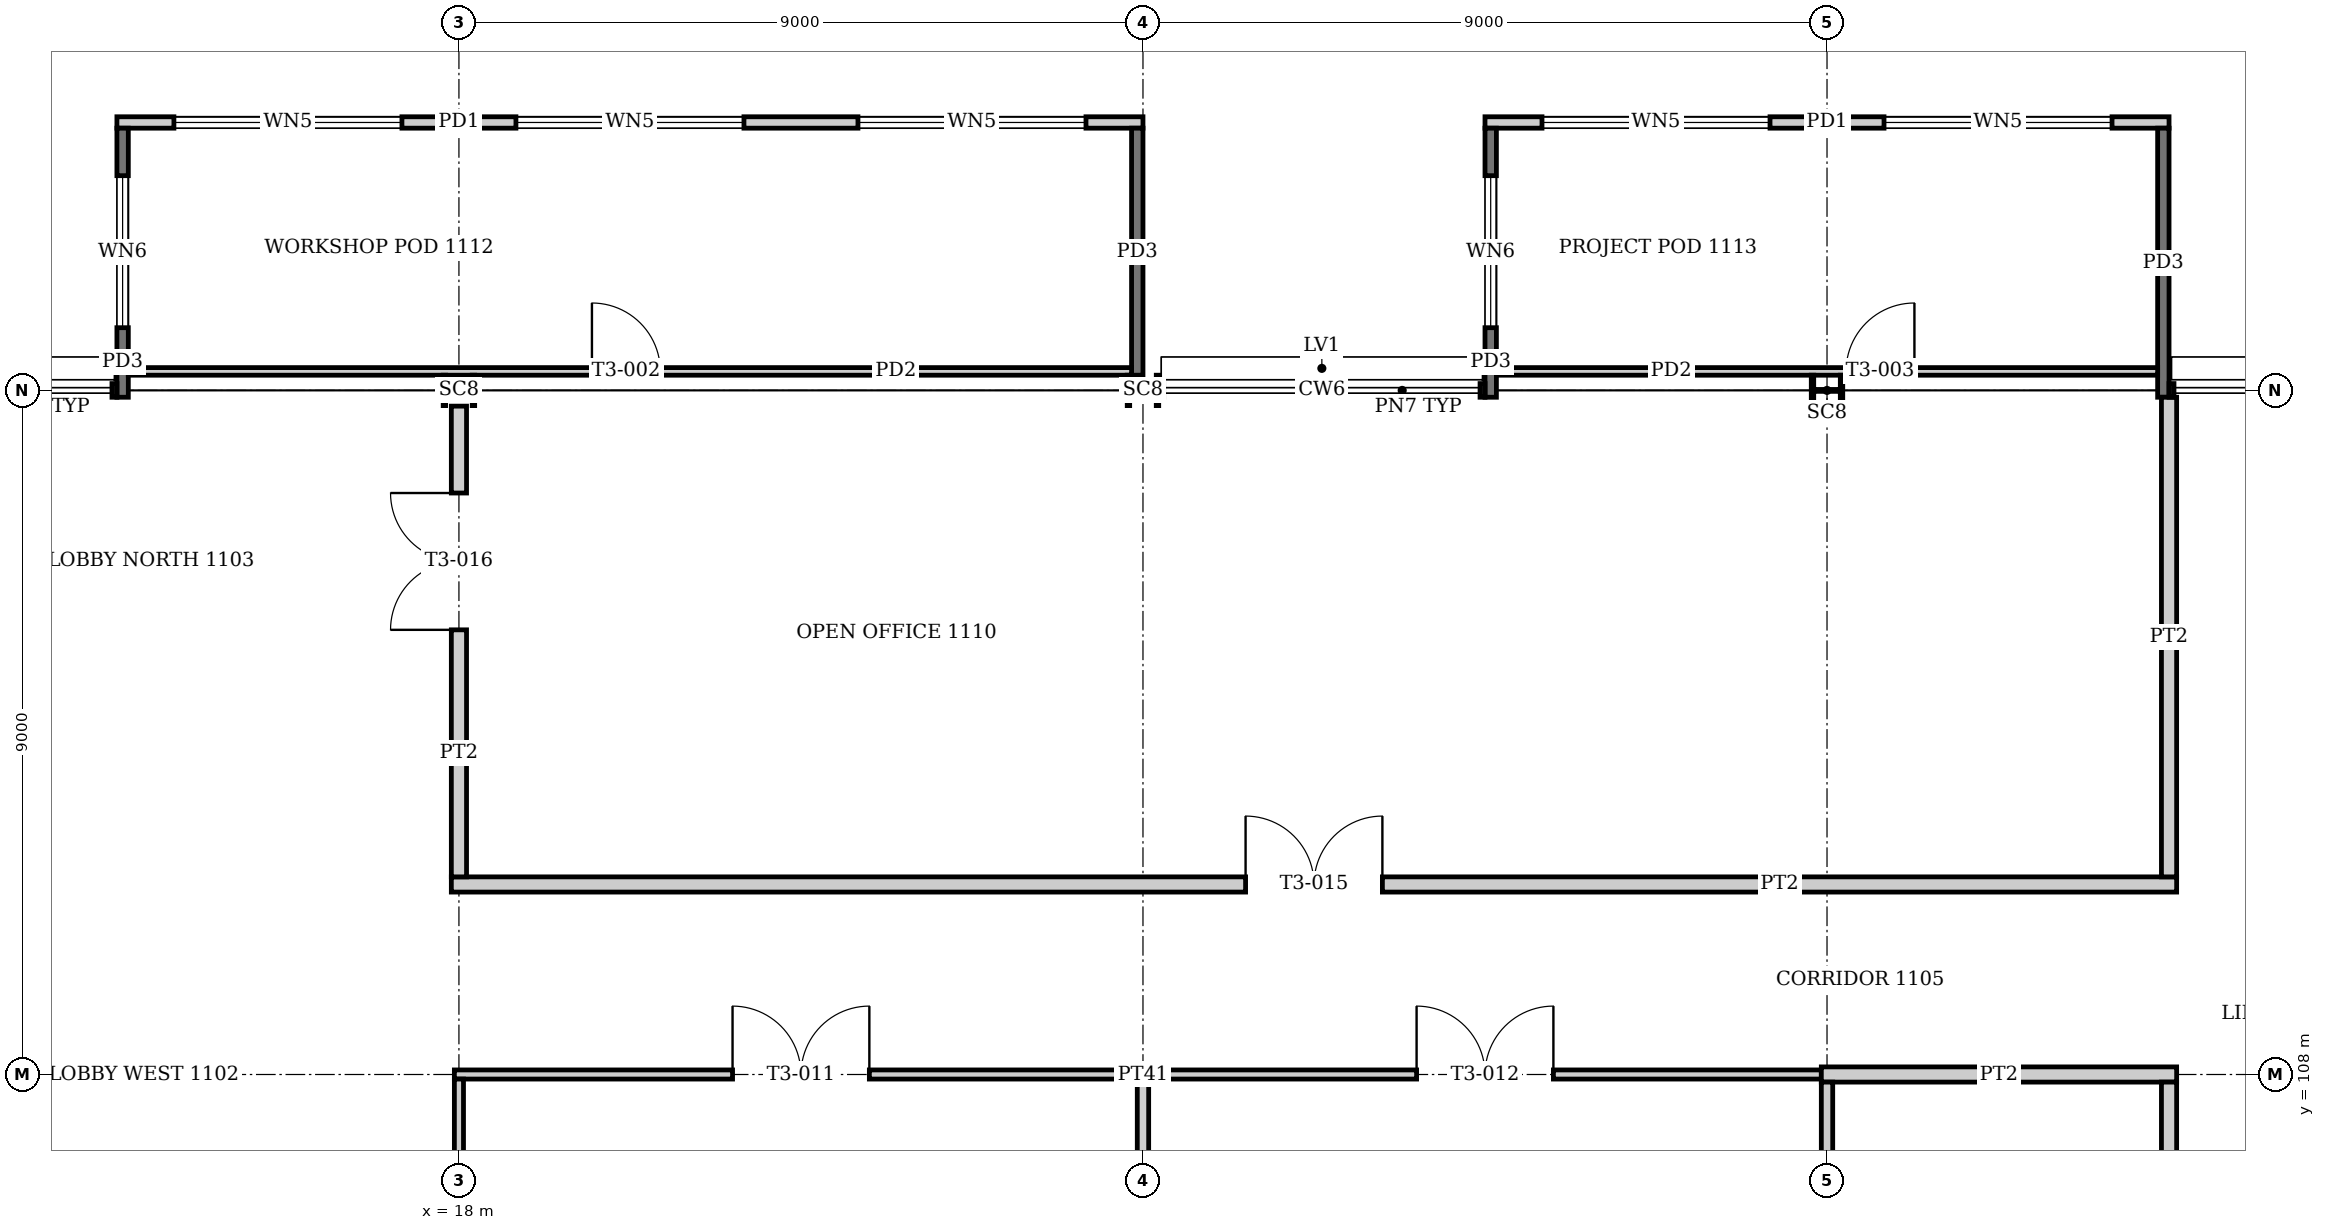
"""IFC4 building model, lengths in metres.
Left out: names, types, materials, properties, quantities, classifications, styles, units other than length and angle.
Written with IfcOpenShell. Run it as: python <this file> out.ifc"""

import sys

from ifc_helpers import new_model, si_unit, direction, frame, frame_2d, origin, origin_2d, place, context, subcontext, project, spatial, rectangle, i_section, extrude, element, fill, save


model = new_model("IFC4")
c1 = context("Model", 3, precision=1e-05, world=origin(), true_north=direction((0.0, 1.0)))
c2 = subcontext(c1, "Body", "Model", "MODEL_VIEW")
j1 = project(units=[si_unit("LENGTHUNIT", "METRE"), si_unit("PLANEANGLEUNIT", "RADIAN")], contexts=[c1])
p1 = place(None, origin())
s1 = spatial("IfcSite", under=j1, at=p1, CompositionType="ELEMENT")
p2 = place(p1, origin())
s2 = spatial("IfcBuilding", under=s1, at=p2, CompositionType="ELEMENT")
p3 = place(p2, frame((0.0, 0.0, 47.2)))
s3 = spatial("IfcBuildingStorey", under=s2, at=p3, CompositionType="ELEMENT", Elevation=47.2)
for number, where, z_axis, x_axis in (
    (1, (18.0, 117.0, 0.0), (0.0, 0.0, 1.0), (0.0, 1.0, 0.0)),
    (2, (27.0, 117.0, 0.0), (0.0, 0.0, 1.0), (0.0, 1.0, 0.0)),
    (3, (36.0, 117.0, 0.0), (0.0, 0.0, 1.0), (0.0, 1.0, 0.0)),
):
    element("IfcColumn", number, at=place(p3, frame(where, z_axis=z_axis, x_axis=x_axis)), inside=s3, PredefinedType="COLUMN", context=c2, shape_type="SweptSolid", body=[
        extrude(i_section(OverallWidth=0.4, OverallDepth=0.414, WebThickness=0.025, FlangeThickness=0.032, at=origin_2d()), origin(), (0.0, 0.0, 1.0), 4.0),
    ])
p4 = place(p3, frame((13.5, 120.525, 0.0), z_axis=(0.0, 0.0, 1.0), x_axis=(1.0, 0.0, 0.0)))
e4 = element("IfcWall", 4, at=p4, inside=s3, PredefinedType="SOLIDWALL", context=c2, shape_type="SweptSolid", body=[
    extrude(rectangle(XDim=13.5, YDim=0.15, at=frame_2d((6.75, 0.0))), origin(), (0.0, 0.0, 1.0), 2.6),
])
p5 = place(p4, frame((0.75, 0.0, 0.9)))
e5 = element("IfcOpeningElement", 5, at=p5, cuts=e4, PredefinedType="OPENING", context=c2, shape_type="SweptSolid", body=[
    extrude(rectangle(XDim=3.0, YDim=1.4, at=frame_2d((1.5, 0.7))), frame((0.0, 0.085, 0.0), z_axis=(0.0, -1.0, 0.0), x_axis=(1.0, 0.0, 0.0)), (0.0, 0.0, 1.0), 0.17),
])
p6 = place(p4, frame((5.25, 0.0, 0.9)))
e6 = element("IfcOpeningElement", 6, at=p6, cuts=e4, PredefinedType="OPENING", context=c2, shape_type="SweptSolid", body=[
    extrude(rectangle(XDim=3.0, YDim=1.4, at=frame_2d((1.5, 0.7))), frame((0.0, 0.085, 0.0), z_axis=(0.0, -1.0, 0.0), x_axis=(1.0, 0.0, 0.0)), (0.0, 0.0, 1.0), 0.17),
])
p7 = place(p4, frame((9.75, 0.0, 0.9)))
e7 = element("IfcOpeningElement", 7, at=p7, cuts=e4, PredefinedType="OPENING", context=c2, shape_type="SweptSolid", body=[
    extrude(rectangle(XDim=3.0, YDim=1.4, at=frame_2d((1.5, 0.7))), frame((0.0, 0.085, 0.0), z_axis=(0.0, -1.0, 0.0), x_axis=(1.0, 0.0, 0.0)), (0.0, 0.0, 1.0), 0.17),
])
p8 = place(p3, frame((13.575, 120.45, -0.15), z_axis=(0.0, 0.0, 1.0), x_axis=(0.0, -1.0, 0.0)))
e8 = element("IfcWall", 8, at=p8, inside=s3, PredefinedType="SOLIDWALL", context=c2, shape_type="SweptSolid", body=[
    extrude(rectangle(XDim=3.54, YDim=0.15, at=frame_2d((1.77, 0.0))), origin(), (0.0, 0.0, 1.0), 2.75),
])
p9 = place(p8, frame((0.625, 0.0, 1.05)))
e9 = element("IfcOpeningElement", 9, at=p9, cuts=e8, PredefinedType="OPENING", context=c2, shape_type="SweptSolid", body=[
    extrude(rectangle(XDim=2.0, YDim=1.4, at=frame_2d((1.0, 0.7))), frame((0.0, 0.085, 0.0), z_axis=(0.0, -1.0, 0.0), x_axis=(1.0, 0.0, 0.0)), (0.0, 0.0, 1.0), 0.17),
])
p10 = place(p3, frame((26.925, 120.45, -0.15), z_axis=(0.0, 0.0, 1.0), x_axis=(0.0, -1.0, 0.0)))
e10 = element("IfcWall", 10, at=p10, inside=s3, PredefinedType="SOLIDWALL", context=c2, shape_type="SweptSolid", body=[
    extrude(rectangle(XDim=3.25, YDim=0.15, at=frame_2d((1.625, 0.0))), origin(), (0.0, 0.0, 1.0), 2.75),
])
p11 = place(p3, frame((13.65, 117.25, 0.0), z_axis=(0.0, 0.0, 1.0), x_axis=(1.0, 0.0, 0.0)))
e11 = element("IfcWall", 11, at=p11, inside=s3, PredefinedType="PARTITIONING", context=c2, shape_type="SweptSolid", body=[
    extrude(rectangle(XDim=13.2, YDim=0.1, at=frame_2d((6.6, 0.0))), origin(), (0.0, 0.0, 1.0), 2.6),
])
p12 = place(p11, frame((6.1, 0.0, 0.0)))
e12 = element("IfcOpeningElement", 12, at=p12, cuts=e11, PredefinedType="OPENING", context=c2, shape_type="SweptSolid", body=[
    extrude(rectangle(XDim=0.9, YDim=2.1, at=frame_2d((0.45, 1.05))), frame((0.0, 0.06, 0.0), z_axis=(0.0, -1.0, 0.0), x_axis=(1.0, 0.0, 0.0)), (0.0, 0.0, 1.0), 0.12),
])
p13 = place(p3, frame((31.5, 120.525, 0.0), z_axis=(0.0, 0.0, 1.0), x_axis=(1.0, 0.0, 0.0)))
e13 = element("IfcWall", 13, at=p13, inside=s3, PredefinedType="SOLIDWALL", context=c2, shape_type="SweptSolid", body=[
    extrude(rectangle(XDim=9.0, YDim=0.15, at=frame_2d((4.5, 0.0))), origin(), (0.0, 0.0, 1.0), 2.6),
])
p14 = place(p13, frame((0.75, 0.0, 0.9)))
e14 = element("IfcOpeningElement", 14, at=p14, cuts=e13, PredefinedType="OPENING", context=c2, shape_type="SweptSolid", body=[
    extrude(rectangle(XDim=3.0, YDim=1.4, at=frame_2d((1.5, 0.7))), frame((0.0, 0.085, 0.0), z_axis=(0.0, -1.0, 0.0), x_axis=(1.0, 0.0, 0.0)), (0.0, 0.0, 1.0), 0.17),
])
p15 = place(p13, frame((5.25, 0.0, 0.9)))
e15 = element("IfcOpeningElement", 15, at=p15, cuts=e13, PredefinedType="OPENING", context=c2, shape_type="SweptSolid", body=[
    extrude(rectangle(XDim=3.0, YDim=1.4, at=frame_2d((1.5, 0.7))), frame((0.0, 0.085, 0.0), z_axis=(0.0, -1.0, 0.0), x_axis=(1.0, 0.0, 0.0)), (0.0, 0.0, 1.0), 0.17),
])
p16 = place(p3, frame((31.575, 120.45, -0.15), z_axis=(0.0, 0.0, 1.0), x_axis=(0.0, -1.0, 0.0)))
e16 = element("IfcWall", 16, at=p16, inside=s3, PredefinedType="SOLIDWALL", context=c2, shape_type="SweptSolid", body=[
    extrude(rectangle(XDim=3.54, YDim=0.15, at=frame_2d((1.77, 0.0))), origin(), (0.0, 0.0, 1.0), 2.75),
])
p17 = place(p16, frame((0.625, 0.0, 1.05)))
e17 = element("IfcOpeningElement", 17, at=p17, cuts=e16, PredefinedType="OPENING", context=c2, shape_type="SweptSolid", body=[
    extrude(rectangle(XDim=2.0, YDim=1.4, at=frame_2d((1.0, 0.7))), frame((0.0, 0.085, 0.0), z_axis=(0.0, -1.0, 0.0), x_axis=(1.0, 0.0, 0.0)), (0.0, 0.0, 1.0), 0.17),
])
p18 = place(p3, frame((40.425, 120.45, -0.15), z_axis=(0.0, 0.0, 1.0), x_axis=(0.0, -1.0, 0.0)))
e18 = element("IfcWall", 18, at=p18, inside=s3, PredefinedType="SOLIDWALL", context=c2, shape_type="SweptSolid", body=[
    extrude(rectangle(XDim=3.54, YDim=0.15, at=frame_2d((1.77, 0.0))), origin(), (0.0, 0.0, 1.0), 2.75),
])
p19 = place(p3, frame((31.65, 117.25, 0.0), z_axis=(0.0, 0.0, 1.0), x_axis=(1.0, 0.0, 0.0)))
e19 = element("IfcWall", 19, at=p19, inside=s3, PredefinedType="PARTITIONING", context=c2, shape_type="SweptSolid", body=[
    extrude(rectangle(XDim=8.7, YDim=0.1, at=frame_2d((4.35, 0.0))), origin(), (0.0, 0.0, 1.0), 2.6),
])
p20 = place(p19, frame((4.6, 0.0, 0.0)))
e20 = element("IfcOpeningElement", 20, at=p20, cuts=e19, PredefinedType="OPENING", context=c2, shape_type="SweptSolid", body=[
    extrude(rectangle(XDim=0.9, YDim=2.1, at=frame_2d((0.45, 1.05))), frame((0.0, 0.06, 0.0), z_axis=(0.0, -1.0, 0.0), x_axis=(1.0, 0.0, 0.0)), (0.0, 0.0, 1.0), 0.12),
])
p21 = place(p3, frame((17.94, 108.0, 0.0), z_axis=(0.0, 0.0, 1.0), x_axis=(1.0, 0.0, 0.0)))
e21 = element("IfcWall", 21, at=p21, inside=s3, PredefinedType="PARTITIONING", context=c2, shape_type="SweptSolid", body=[
    extrude(rectangle(XDim=17.985, YDim=0.12, at=frame_2d((8.993, 0.0))), origin(), (0.0, 0.0, 1.0), 3.05),
])
p22 = place(p21, frame((3.66, 0.0, 0.0)))
e22 = element("IfcOpeningElement", 22, at=p22, cuts=e21, PredefinedType="OPENING", context=c2, shape_type="SweptSolid", body=[
    extrude(rectangle(XDim=1.8, YDim=2.1, at=frame_2d((0.9, 1.05))), frame((0.0, 0.07, 0.0), z_axis=(0.0, -1.0, 0.0), x_axis=(1.0, 0.0, 0.0)), (0.0, 0.0, 1.0), 0.14),
])
p23 = place(p21, frame((12.66, 0.0, 0.0)))
e23 = element("IfcOpeningElement", 23, at=p23, cuts=e21, PredefinedType="OPENING", context=c2, shape_type="SweptSolid", body=[
    extrude(rectangle(XDim=1.8, YDim=2.1, at=frame_2d((0.9, 1.05))), frame((0.0, 0.07, 0.0), z_axis=(0.0, -1.0, 0.0), x_axis=(1.0, 0.0, 0.0)), (0.0, 0.0, 1.0), 0.14),
])
p24 = place(p3, frame((35.925, 108.0, 0.0), z_axis=(0.0, 0.0, 1.0), x_axis=(1.0, 0.0, 0.0)))
e24 = element("IfcWall", 24, at=p24, inside=s3, PredefinedType="PARTITIONING", context=c2, shape_type="SweptSolid", body=[
    extrude(rectangle(XDim=4.675, YDim=0.2, at=frame_2d((2.337, 0.0))), origin(), (0.0, 0.0, 1.0), 3.05),
])
p25 = place(p3, frame((17.9, 110.5, 0.0), z_axis=(0.0, 0.0, 1.0), x_axis=(1.0, 0.0, 0.0)))
e25 = element("IfcWall", 25, at=p25, inside=s3, PredefinedType="PARTITIONING", context=c2, shape_type="SweptSolid", body=[
    extrude(rectangle(XDim=22.7, YDim=0.2, at=frame_2d((11.35, 0.0))), origin(), (0.0, 0.0, 1.0), 3.05),
])
p26 = place(p25, frame((10.45, 0.0, 0.0)))
e26 = element("IfcOpeningElement", 26, at=p26, cuts=e25, PredefinedType="OPENING", context=c2, shape_type="SweptSolid", body=[
    extrude(rectangle(XDim=1.8, YDim=2.1, at=frame_2d((0.9, 1.05))), frame((0.0, 0.11, 0.0), z_axis=(0.0, -1.0, 0.0), x_axis=(1.0, 0.0, 0.0)), (0.0, 0.0, 1.0), 0.22),
])
p27 = place(p3, frame((18.0, 99.207, 0.0), z_axis=(0.0, 0.0, 1.0), x_axis=(0.0, 1.0, 0.0)))
e27 = element("IfcWall", 27, at=p27, inside=s3, PredefinedType="PARTITIONING", context=c2, shape_type="SweptSolid", body=[
    extrude(rectangle(XDim=8.733, YDim=0.12, at=frame_2d((4.366, 0.0))), origin(), (0.0, 0.0, 1.0), 3.05),
])
p28 = place(p3, frame((18.0, 110.6, 0.0), z_axis=(0.0, 0.0, 1.0), x_axis=(0.0, 1.0, 0.0)))
e28 = element("IfcWall", 28, at=p28, inside=s3, PredefinedType="PARTITIONING", context=c2, shape_type="SweptSolid", body=[
    extrude(rectangle(XDim=6.193, YDim=0.2, at=frame_2d((3.096, 0.0))), origin(), (0.0, 0.0, 1.0), 3.05),
])
p29 = place(p28, frame((3.25, 0.0, 0.0)))
e29 = element("IfcOpeningElement", 29, at=p29, cuts=e28, PredefinedType="OPENING", context=c2, shape_type="SweptSolid", body=[
    extrude(rectangle(XDim=1.8, YDim=2.1, at=frame_2d((0.9, 1.05))), frame((0.0, 0.11, 0.0), z_axis=(0.0, -1.0, 0.0), x_axis=(1.0, 0.0, 0.0)), (0.0, 0.0, 1.0), 0.22),
])
p30 = place(p3, frame((27.0, 99.207, 0.0), z_axis=(0.0, 0.0, 1.0), x_axis=(0.0, 1.0, 0.0)))
e30 = element("IfcWall", 30, at=p30, inside=s3, PredefinedType="PARTITIONING", context=c2, shape_type="SweptSolid", body=[
    extrude(rectangle(XDim=8.733, YDim=0.15, at=frame_2d((4.366, 0.0))), origin(), (0.0, 0.0, 1.0), 3.05),
])
p31 = place(p3, frame((36.0, 99.207, 0.0), z_axis=(0.0, 0.0, 1.0), x_axis=(0.0, 1.0, 0.0)))
e31 = element("IfcWall", 31, at=p31, inside=s3, PredefinedType="PARTITIONING", context=c2, shape_type="SweptSolid", body=[
    extrude(rectangle(XDim=8.693, YDim=0.15, at=frame_2d((4.346, 0.0))), origin(), (0.0, 0.0, 1.0), 3.05),
])
p32 = place(p3, frame((40.5, 99.075, 0.0), z_axis=(0.0, 0.0, 1.0), x_axis=(0.0, 1.0, 0.0)))
e32 = element("IfcWall", 32, at=p32, inside=s3, PredefinedType="PARTITIONING", context=c2, shape_type="SweptSolid", body=[
    extrude(rectangle(XDim=8.825, YDim=0.2, at=frame_2d((4.413, 0.0))), origin(), (0.0, 0.0, 1.0), 3.05),
])
p33 = place(p32, frame((1.775, 0.0, 0.0)))
e33 = element("IfcOpeningElement", 33, at=p33, cuts=e32, PredefinedType="OPENING", context=c2, shape_type="SweptSolid", body=[
    extrude(rectangle(XDim=0.8, YDim=2.1, at=frame_2d((0.4, 1.05))), frame((0.0, 0.11, 0.0), z_axis=(0.0, -1.0, 0.0), x_axis=(1.0, 0.0, 0.0)), (0.0, 0.0, 1.0), 0.22),
])
p34 = place(p32, frame((6.275, 0.0, 0.0)))
e34 = element("IfcOpeningElement", 34, at=p34, cuts=e32, PredefinedType="OPENING", context=c2, shape_type="SweptSolid", body=[
    extrude(rectangle(XDim=0.8, YDim=2.1, at=frame_2d((0.4, 1.05))), frame((0.0, 0.11, 0.0), z_axis=(0.0, -1.0, 0.0), x_axis=(1.0, 0.0, 0.0)), (0.0, 0.0, 1.0), 0.22),
])
p35 = place(p3, frame((40.5, 110.6, 0.0), z_axis=(0.0, 0.0, 1.0), x_axis=(0.0, 1.0, 0.0)))
e35 = element("IfcWall", 35, at=p35, inside=s3, PredefinedType="PARTITIONING", context=c2, shape_type="SweptSolid", body=[
    extrude(rectangle(XDim=6.31, YDim=0.2, at=frame_2d((3.155, 0.0))), origin(), (0.0, 0.0, 1.0), 3.05),
])
p36 = place(p5, origin())
e36 = element("IfcWindow", 36, at=p36, inside=s3, PartitioningType="SINGLE_PANEL", PredefinedType="WINDOW", context=c2, shape_type="SweptSolid", body=[
    extrude(rectangle(XDim=3.0, YDim=1.4, at=frame_2d((1.5, 0.7))), frame((0.0, 0.03, 0.0), z_axis=(0.0, -1.0, 0.0), x_axis=(1.0, 0.0, 0.0)), (0.0, 0.0, 1.0), 0.06),
])
fill(e5, e36)
p37 = place(p6, origin())
e37 = element("IfcWindow", 37, at=p37, inside=s3, PartitioningType="SINGLE_PANEL", PredefinedType="WINDOW", context=c2, shape_type="SweptSolid", body=[
    extrude(rectangle(XDim=3.0, YDim=1.4, at=frame_2d((1.5, 0.7))), frame((0.0, 0.03, 0.0), z_axis=(0.0, -1.0, 0.0), x_axis=(1.0, 0.0, 0.0)), (0.0, 0.0, 1.0), 0.06),
])
fill(e6, e37)
p38 = place(p7, origin())
e38 = element("IfcWindow", 38, at=p38, inside=s3, PartitioningType="SINGLE_PANEL", PredefinedType="WINDOW", context=c2, shape_type="SweptSolid", body=[
    extrude(rectangle(XDim=3.0, YDim=1.4, at=frame_2d((1.5, 0.7))), frame((0.0, 0.03, 0.0), z_axis=(0.0, -1.0, 0.0), x_axis=(1.0, 0.0, 0.0)), (0.0, 0.0, 1.0), 0.06),
])
fill(e7, e38)
p39 = place(p9, origin())
e39 = element("IfcWindow", 39, at=p39, inside=s3, PartitioningType="SINGLE_PANEL", PredefinedType="WINDOW", context=c2, shape_type="SweptSolid", body=[
    extrude(rectangle(XDim=2.0, YDim=1.4, at=frame_2d((1.0, 0.7))), frame((0.0, 0.03, 0.0), z_axis=(0.0, -1.0, 0.0), x_axis=(1.0, 0.0, 0.0)), (0.0, 0.0, 1.0), 0.06),
])
fill(e9, e39)
p40 = place(p12, origin())
e40 = element("IfcDoor", 40, at=p40, inside=s3, OperationType="SINGLE_SWING_LEFT", PredefinedType="DOOR", context=c2, shape_type="SweptSolid", body=[
    extrude(rectangle(XDim=0.9, YDim=2.1, at=frame_2d((0.45, 1.05))), frame((0.0, 0.025, 0.0), z_axis=(0.0, -1.0, 0.0), x_axis=(1.0, 0.0, 0.0)), (0.0, 0.0, 1.0), 0.05),
])
fill(e12, e40)
p41 = place(p14, origin())
e41 = element("IfcWindow", 41, at=p41, inside=s3, PartitioningType="SINGLE_PANEL", PredefinedType="WINDOW", context=c2, shape_type="SweptSolid", body=[
    extrude(rectangle(XDim=3.0, YDim=1.4, at=frame_2d((1.5, 0.7))), frame((0.0, 0.03, 0.0), z_axis=(0.0, -1.0, 0.0), x_axis=(1.0, 0.0, 0.0)), (0.0, 0.0, 1.0), 0.06),
])
fill(e14, e41)
p42 = place(p15, origin())
e42 = element("IfcWindow", 42, at=p42, inside=s3, PartitioningType="SINGLE_PANEL", PredefinedType="WINDOW", context=c2, shape_type="SweptSolid", body=[
    extrude(rectangle(XDim=3.0, YDim=1.4, at=frame_2d((1.5, 0.7))), frame((0.0, 0.03, 0.0), z_axis=(0.0, -1.0, 0.0), x_axis=(1.0, 0.0, 0.0)), (0.0, 0.0, 1.0), 0.06),
])
fill(e15, e42)
p43 = place(p17, origin())
e43 = element("IfcWindow", 43, at=p43, inside=s3, PartitioningType="SINGLE_PANEL", PredefinedType="WINDOW", context=c2, shape_type="SweptSolid", body=[
    extrude(rectangle(XDim=2.0, YDim=1.4, at=frame_2d((1.0, 0.7))), frame((0.0, 0.03, 0.0), z_axis=(0.0, -1.0, 0.0), x_axis=(1.0, 0.0, 0.0)), (0.0, 0.0, 1.0), 0.06),
])
fill(e17, e43)
p44 = place(p20, origin())
e44 = element("IfcDoor", 44, at=p44, inside=s3, OperationType="SINGLE_SWING_RIGHT", PredefinedType="DOOR", context=c2, shape_type="SweptSolid", body=[
    extrude(rectangle(XDim=0.9, YDim=2.1, at=frame_2d((0.45, 1.05))), frame((0.0, 0.025, 0.0), z_axis=(0.0, -1.0, 0.0), x_axis=(1.0, 0.0, 0.0)), (0.0, 0.0, 1.0), 0.05),
])
fill(e20, e44)
p45 = place(p22, origin())
e45 = element("IfcDoor", 45, at=p45, inside=s3, OperationType="DOUBLE_DOOR_SINGLE_SWING", PredefinedType="DOOR", context=c2, shape_type="SweptSolid", body=[
    extrude(rectangle(XDim=1.8, YDim=2.1, at=frame_2d((0.9, 1.05))), frame((0.0, 0.025, 0.0), z_axis=(0.0, -1.0, 0.0), x_axis=(1.0, 0.0, 0.0)), (0.0, 0.0, 1.0), 0.05),
])
fill(e22, e45)
p46 = place(p23, origin())
e46 = element("IfcDoor", 46, at=p46, inside=s3, OperationType="DOUBLE_DOOR_SINGLE_SWING", PredefinedType="DOOR", context=c2, shape_type="SweptSolid", body=[
    extrude(rectangle(XDim=1.8, YDim=2.1, at=frame_2d((0.9, 1.05))), frame((0.0, 0.025, 0.0), z_axis=(0.0, -1.0, 0.0), x_axis=(1.0, 0.0, 0.0)), (0.0, 0.0, 1.0), 0.05),
])
fill(e23, e46)
p47 = place(p26, origin())
e47 = element("IfcDoor", 47, at=p47, inside=s3, OperationType="DOUBLE_DOOR_SINGLE_SWING", PredefinedType="DOOR", context=c2, shape_type="SweptSolid", body=[
    extrude(rectangle(XDim=1.8, YDim=2.1, at=frame_2d((0.9, 1.05))), frame((0.0, 0.025, 0.0), z_axis=(0.0, -1.0, 0.0), x_axis=(1.0, 0.0, 0.0)), (0.0, 0.0, 1.0), 0.05),
])
fill(e26, e47)
p48 = place(p29, origin())
e48 = element("IfcDoor", 48, at=p48, inside=s3, OperationType="DOUBLE_DOOR_SINGLE_SWING", PredefinedType="DOOR", context=c2, shape_type="SweptSolid", body=[
    extrude(rectangle(XDim=1.8, YDim=2.1, at=frame_2d((0.9, 1.05))), frame((0.0, 0.025, 0.0), z_axis=(0.0, -1.0, 0.0), x_axis=(1.0, 0.0, 0.0)), (0.0, 0.0, 1.0), 0.05),
])
fill(e29, e48)
save(model, sys.argv[1])
